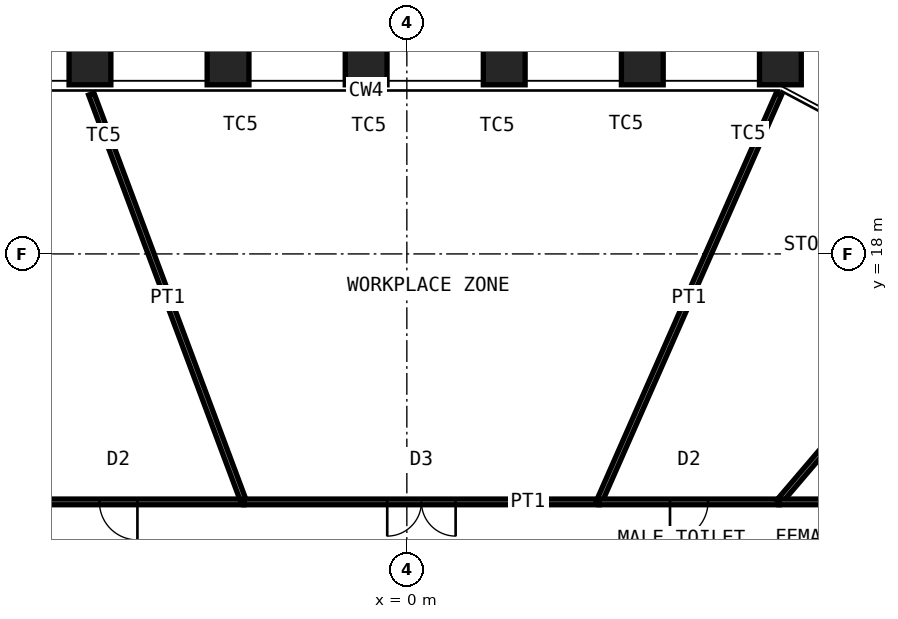
"""IFC4 building model, lengths in metres.
Left out: names, types, materials, properties, quantities, classifications, styles, units other than length and angle.
Written with IfcOpenShell. Run it as: python <this file> out.ifc"""

import sys

from ifc_helpers import new_model, si_unit, direction, frame, frame_2d, origin, origin_2d, place, context, subcontext, project, spatial, rectangle, hollow_rectangle, extrude, element, fill, save


model = new_model("IFC4")
c1 = context("Model", 3, precision=1e-05, world=origin(), true_north=direction((0.0, 1.0)))
c2 = subcontext(c1, "Body", "Model", "MODEL_VIEW")
j1 = project(units=[si_unit("LENGTHUNIT", "METRE"), si_unit("PLANEANGLEUNIT", "RADIAN")], contexts=[c1])
p1 = place(None, origin())
s1 = spatial("IfcSite", under=j1, at=p1, CompositionType="ELEMENT")
p2 = place(p1, origin())
s2 = spatial("IfcBuilding", under=s1, at=p2, CompositionType="ELEMENT")
p3 = place(p2, frame((0.0, 0.0, 193.0)))
s3 = spatial("IfcBuildingStorey", under=s2, at=p3, CompositionType="ELEMENT", Elevation=193.0)
for number, where, z_axis, x_axis in (
    (1, (-8.338, 23.0, 0.0), (0.0, 0.0, 1.0), (-1.0, 0.0, 0.0)),
    (2, (-4.705, 23.0, 0.0), (0.0, 0.0, 1.0), (-1.0, 0.0, 0.0)),
    (3, (-1.071, 23.0, 0.0), (0.0, 0.0, 1.0), (-1.0, 0.0, 0.0)),
    (4, (2.562, 23.0, 0.0), (0.0, 0.0, 1.0), (-1.0, 0.0, 0.0)),
    (5, (6.196, 23.0, 0.0), (0.0, 0.0, 1.0), (-1.0, 0.0, 0.0)),
    (6, (9.829, 23.0, 0.0), (0.0, 0.0, 1.0), (-1.0, 0.0, 0.0)),
):
    element("IfcColumn", number, at=place(p3, frame(where, z_axis=z_axis, x_axis=x_axis)), inside=s3, PredefinedType="COLUMN", context=c2, shape_type="SweptSolid", body=[
        extrude(hollow_rectangle(XDim=1.1, YDim=1.1, WallThickness=0.07, at=origin_2d()), origin(), (0.0, 0.0, 1.0), 4.2),
    ])
p4 = place(p3, frame((-10.889, 11.475, 0.0), z_axis=(0.0, 0.0, 1.0), x_axis=(1.0, 0.0, 0.0)))
e7 = element("IfcWall", 7, at=p4, inside=s3, PredefinedType="PARTITIONING", context=c2, shape_type="SweptSolid", body=[
    extrude(rectangle(XDim=6.598, YDim=0.15, at=frame_2d((3.299, 0.0))), origin(), (0.0, 0.0, 1.0), 4.03),
])
p5 = place(p4, frame((2.799, 0.0, 0.0)))
e8 = element("IfcOpeningElement", 8, at=p5, cuts=e7, PredefinedType="OPENING", context=c2, shape_type="SweptSolid", body=[
    extrude(rectangle(XDim=1.0, YDim=2.4, at=frame_2d((0.5, 1.2))), frame((0.0, 0.085, 0.0), z_axis=(0.0, -1.0, 0.0), x_axis=(1.0, 0.0, 0.0)), (0.0, 0.0, 1.0), 0.17),
])
p6 = place(p3, frame((-8.303, 22.206, 0.0), z_axis=(0.0, 0.0, 1.0), x_axis=(0.350242883069, -0.936658914899, 0.0)))
e9 = element("IfcWall", 9, at=p6, inside=s3, PredefinedType="PARTITIONING", context=c2, shape_type="SweptSolid", body=[
    extrude(rectangle(XDim=11.457, YDim=0.15, at=frame_2d((5.729, 0.0))), origin(), (0.0, 0.0, 1.0), 3.43),
])
p7 = place(p3, frame((-4.291, 11.475, 0.0), z_axis=(0.0, 0.0, 1.0), x_axis=(1.0, 0.0, 0.0)))
e10 = element("IfcWall", 10, at=p7, inside=s3, PredefinedType="PARTITIONING", context=c2, shape_type="SweptSolid", body=[
    extrude(rectangle(XDim=9.349, YDim=0.15, at=frame_2d((4.674, 0.0))), origin(), (0.0, 0.0, 1.0), 4.03),
])
p8 = place(p7, frame((3.774, 0.0, 0.0)))
e11 = element("IfcOpeningElement", 11, at=p8, cuts=e10, PredefinedType="OPENING", context=c2, shape_type="SweptSolid", body=[
    extrude(rectangle(XDim=1.8, YDim=2.4, at=frame_2d((0.9, 1.2))), frame((0.0, 0.085, 0.0), z_axis=(0.0, -1.0, 0.0), x_axis=(1.0, 0.0, 0.0)), (0.0, 0.0, 1.0), 0.17),
])
p9 = place(p3, frame((9.789, 22.208, 0.0), z_axis=(0.0, 0.0, 1.0), x_axis=(-0.403346052835, -0.9150475188, 0.0)))
e12 = element("IfcWall", 12, at=p9, inside=s3, PredefinedType="PARTITIONING", context=c2, shape_type="SweptSolid", body=[
    extrude(rectangle(XDim=11.73, YDim=0.15, at=frame_2d((5.865, 0.0))), origin(), (0.0, 0.0, 1.0), 2.93),
])
p10 = place(p3, frame((5.058, 11.475, 0.0), z_axis=(0.0, 0.0, 1.0), x_axis=(1.0, 0.0, 0.0)))
e13 = element("IfcWall", 13, at=p10, inside=s3, PredefinedType="PARTITIONING", context=c2, shape_type="SweptSolid", body=[
    extrude(rectangle(XDim=4.733, YDim=0.15, at=frame_2d((2.367, 0.0))), origin(), (0.0, 0.0, 1.0), 4.03),
])
p11 = place(p10, frame((1.867, 0.0, 0.0)))
e14 = element("IfcOpeningElement", 14, at=p11, cuts=e13, PredefinedType="OPENING", context=c2, shape_type="SweptSolid", body=[
    extrude(rectangle(XDim=1.0, YDim=2.4, at=frame_2d((0.5, 1.2))), frame((0.0, 0.085, 0.0), z_axis=(0.0, -1.0, 0.0), x_axis=(1.0, 0.0, 0.0)), (0.0, 0.0, 1.0), 0.17),
])
p12 = place(p3, frame((14.958, 17.531, 0.0), z_axis=(0.0, 0.0, 1.0), x_axis=(-0.649097500837, -0.760705221756, 0.0)))
e15 = element("IfcWall", 15, at=p12, inside=s3, PredefinedType="PARTITIONING", context=c2, shape_type="SweptSolid", body=[
    extrude(rectangle(XDim=7.96, YDim=0.15, at=frame_2d((3.98, 0.0))), origin(), (0.0, 0.0, 1.0), 3.43),
])
p13 = place(p3, frame((9.791, 11.475, 0.0), z_axis=(0.0, 0.0, 1.0), x_axis=(1.0, 0.0, 0.0)))
e16 = element("IfcWall", 16, at=p13, inside=s3, PredefinedType="PARTITIONING", context=c2, shape_type="SweptSolid", body=[
    extrude(rectangle(XDim=4.684, YDim=0.15, at=frame_2d((2.342, 0.0))), origin(), (0.0, 0.0, 1.0), 4.03),
])
p14 = place(p5, origin())
e17 = element("IfcDoor", 17, at=p14, inside=s3, OperationType="SINGLE_SWING_RIGHT", PredefinedType="DOOR", context=c2, shape_type="SweptSolid", body=[
    extrude(rectangle(XDim=1.0, YDim=2.4, at=frame_2d((0.5, 1.2))), frame((0.0, 0.025, 0.0), z_axis=(0.0, -1.0, 0.0), x_axis=(1.0, 0.0, 0.0)), (0.0, 0.0, 1.0), 0.05),
])
fill(e8, e17)
p15 = place(p8, origin())
e18 = element("IfcDoor", 18, at=p15, inside=s3, OperationType="DOUBLE_DOOR_DOUBLE_SWING", PredefinedType="DOOR", context=c2, shape_type="SweptSolid", body=[
    extrude(rectangle(XDim=1.8, YDim=2.4, at=frame_2d((0.9, 1.2))), frame((0.0, 0.025, 0.0), z_axis=(0.0, -1.0, 0.0), x_axis=(1.0, 0.0, 0.0)), (0.0, 0.0, 1.0), 0.05),
])
fill(e11, e18)
p16 = place(p11, origin())
e19 = element("IfcDoor", 19, at=p16, inside=s3, OperationType="SINGLE_SWING_LEFT", PredefinedType="DOOR", context=c2, shape_type="SweptSolid", body=[
    extrude(rectangle(XDim=1.0, YDim=2.4, at=frame_2d((0.5, 1.2))), frame((0.0, 0.025, 0.0), z_axis=(0.0, -1.0, 0.0), x_axis=(1.0, 0.0, 0.0)), (0.0, 0.0, 1.0), 0.05),
])
fill(e14, e19)
save(model, sys.argv[1])
